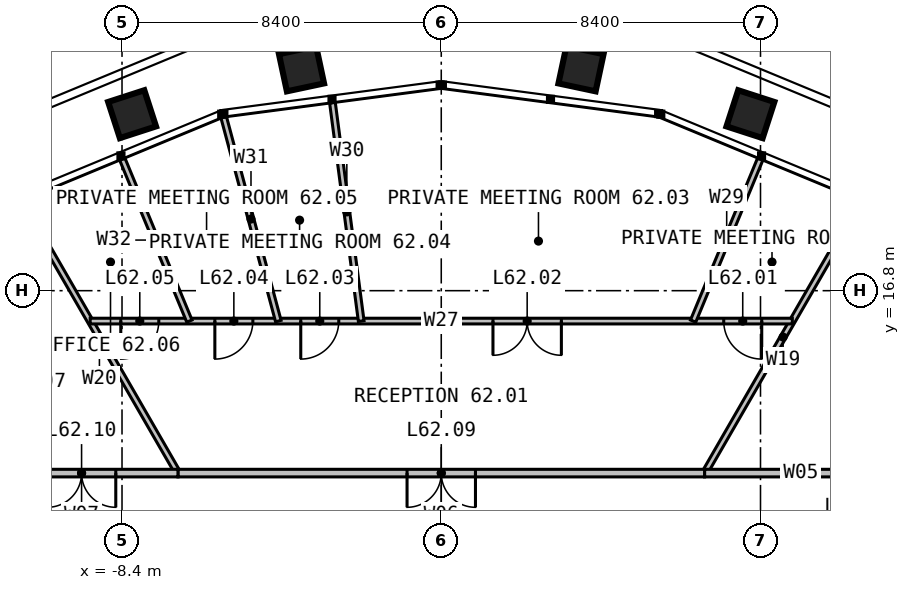
"""IFC4 building model, lengths in metres.
Left out: names, types, materials, properties, quantities, classifications, styles, units other than length and angle.
Written with IfcOpenShell. Run it as: python <this file> out.ifc"""

import sys

from ifc_helpers import new_model, si_unit, direction, frame, frame_2d, origin, place, context, subcontext, project, spatial, rectangle, extrude, element, fill, save


model = new_model("IFC4")
c1 = context("Model", 3, precision=1e-05, world=origin(), true_north=direction((0.0, 1.0)))
c2 = subcontext(c1, "Body", "Model", "MODEL_VIEW")
j1 = project(units=[si_unit("LENGTHUNIT", "METRE"), si_unit("PLANEANGLEUNIT", "RADIAN")], contexts=[c1])
p1 = place(None, origin())
s1 = spatial("IfcSite", under=j1, at=p1, CompositionType="ELEMENT")
p2 = place(p1, origin())
s2 = spatial("IfcBuilding", under=s1, at=p2, CompositionType="ELEMENT")
p3 = place(p2, frame((0.0, 0.0, 256.0)))
s3 = spatial("IfcBuildingStorey", under=s2, at=p3, CompositionType="ELEMENT", Elevation=256.0)
for number, where, z_axis, x_axis in (
    (1, (6.928, 12.0, 0.0), (0.0, 0.0, 1.0), (0.5, 0.866, 0.0)),
    (2, (-6.928, 12.0, 0.0), (0.0, 0.0, 1.0), (-0.5, 0.866, 0.0)),
):
    element("IfcWall", number, at=place(p3, frame(where, z_axis=z_axis, x_axis=x_axis)), inside=s3, PredefinedType="PARTITIONING", context=c2, shape_type="SweptSolid", body=[
        extrude(rectangle(XDim=8.266, YDim=0.15, at=frame_2d((4.133, 0.0))), origin(), (0.0, 0.0, 1.0), 2.79),
    ])
p4 = place(p3, frame((12.0, 12.0, 0.0), z_axis=(0.0, 0.0, 1.0), x_axis=(-1.0, 0.0, 0.0)))
e3 = element("IfcWall", 3, at=p4, inside=s3, PredefinedType="PARTITIONING", context=c2, shape_type="SweptSolid", body=[
    extrude(rectangle(XDim=5.072, YDim=0.2, at=frame_2d((2.536, 0.0))), origin(), (0.0, 0.0, 1.0), 3.8),
])
p5 = place(p3, frame((9.238, 16.0, 0.0), z_axis=(0.0, 0.0, 1.0), x_axis=(-1.0, 0.0, 0.0)))
e4 = element("IfcWall", 4, at=p5, inside=s3, PredefinedType="PARTITIONING", context=c2, shape_type="SweptSolid", body=[
    extrude(rectangle(XDim=18.475, YDim=0.15, at=frame_2d((9.238, 0.0))), origin(), (0.0, 0.0, 1.0), 2.79),
])
p6 = place(p5, frame((0.805, 0.0, 0.0)))
e5 = element("IfcOpeningElement", 5, at=p6, cuts=e4, PredefinedType="OPENING", context=c2, shape_type="SweptSolid", body=[
    extrude(rectangle(XDim=1.0, YDim=2.2, at=frame_2d((0.5, 1.1))), frame((0.0, 0.085, 0.0), z_axis=(0.0, -1.0, 0.0), x_axis=(1.0, 0.0, 0.0)), (0.0, 0.0, 1.0), 0.17),
])
p7 = place(p5, frame((6.077, 0.0, 0.0)))
e6 = element("IfcOpeningElement", 6, at=p7, cuts=e4, PredefinedType="OPENING", context=c2, shape_type="SweptSolid", body=[
    extrude(rectangle(XDim=1.8, YDim=2.2, at=frame_2d((0.9, 1.1))), frame((0.0, 0.085, 0.0), z_axis=(0.0, -1.0, 0.0), x_axis=(1.0, 0.0, 0.0)), (0.0, 0.0, 1.0), 0.17),
])
p8 = place(p5, frame((11.934, 0.0, 0.0)))
e7 = element("IfcOpeningElement", 7, at=p8, cuts=e4, PredefinedType="OPENING", context=c2, shape_type="SweptSolid", body=[
    extrude(rectangle(XDim=1.0, YDim=2.2, at=frame_2d((0.5, 1.1))), frame((0.0, 0.085, 0.0), z_axis=(0.0, -1.0, 0.0), x_axis=(1.0, 0.0, 0.0)), (0.0, 0.0, 1.0), 0.17),
])
p9 = place(p5, frame((14.195, 0.0, 0.0)))
e8 = element("IfcOpeningElement", 8, at=p9, cuts=e4, PredefinedType="OPENING", context=c2, shape_type="SweptSolid", body=[
    extrude(rectangle(XDim=1.0, YDim=2.2, at=frame_2d((0.5, 1.1))), frame((0.0, 0.085, 0.0), z_axis=(0.0, -1.0, 0.0), x_axis=(1.0, 0.0, 0.0)), (0.0, 0.0, 1.0), 0.17),
])
p10 = place(p5, frame((16.67, 0.0, 0.0)))
e9 = element("IfcOpeningElement", 9, at=p10, cuts=e4, PredefinedType="OPENING", context=c2, shape_type="SweptSolid", body=[
    extrude(rectangle(XDim=1.0, YDim=2.2, at=frame_2d((0.5, 1.1))), frame((0.0, 0.085, 0.0), z_axis=(0.0, -1.0, 0.0), x_axis=(1.0, 0.0, 0.0)), (0.0, 0.0, 1.0), 0.17),
])
p11 = place(p3, frame((6.627, 16.0, 0.0), z_axis=(0.0, 0.0, 1.0), x_axis=(0.38266485266, 0.923887228258, 0.0)))
e10 = element("IfcWall", 10, at=p11, inside=s3, PredefinedType="PARTITIONING", context=c2, shape_type="SweptSolid", body=[
    extrude(rectangle(XDim=4.615, YDim=0.15, at=frame_2d((2.307, 0.0))), origin(), (0.0, 0.0, 1.0), 2.79),
])
p12 = place(p3, frame((-2.106, 16.0, 0.0), z_axis=(0.0, 0.0, 1.0), x_axis=(-0.130518811488, 0.991445833038, 0.0)))
e11 = element("IfcWall", 11, at=p12, inside=s3, PredefinedType="PARTITIONING", context=c2, shape_type="SweptSolid", body=[
    extrude(rectangle(XDim=5.795, YDim=0.15, at=frame_2d((2.897, 0.0))), origin(), (0.0, 0.0, 1.0), 2.79),
])
p13 = place(p3, frame((-4.287, 16.0, 0.0), z_axis=(0.0, 0.0, 1.0), x_axis=(-0.25882171764, 0.965925110181, 0.0)))
e12 = element("IfcWall", 12, at=p13, inside=s3, PredefinedType="PARTITIONING", context=c2, shape_type="SweptSolid", body=[
    extrude(rectangle(XDim=5.558, YDim=0.15, at=frame_2d((2.779, 0.0))), origin(), (0.0, 0.0, 1.0), 2.79),
])
p14 = place(p3, frame((-6.627, 16.0, 0.0), z_axis=(0.0, 0.0, 1.0), x_axis=(-0.38266485266, 0.923887228258, 0.0)))
e13 = element("IfcWall", 13, at=p14, inside=s3, PredefinedType="PARTITIONING", context=c2, shape_type="SweptSolid", body=[
    extrude(rectangle(XDim=4.615, YDim=0.15, at=frame_2d((2.307, 0.0))), origin(), (0.0, 0.0, 1.0), 2.79),
])
p15 = place(p3, frame((6.928, 12.0, 0.0), z_axis=(0.0, 0.0, 1.0), x_axis=(-1.0, 0.0, 0.0)))
e14 = element("IfcWall", 14, at=p15, inside=s3, PredefinedType="PARTITIONING", context=c2, shape_type="SweptSolid", body=[
    extrude(rectangle(XDim=13.856, YDim=0.2, at=frame_2d((6.928, 0.0))), origin(), (0.0, 0.0, 1.0), 3.8),
])
p16 = place(p15, frame((6.028, 0.0, 0.0)))
e15 = element("IfcOpeningElement", 15, at=p16, cuts=e14, PredefinedType="OPENING", context=c2, shape_type="SweptSolid", body=[
    extrude(rectangle(XDim=1.8, YDim=2.2, at=frame_2d((0.9, 1.1))), frame((0.0, 0.11, 0.0), z_axis=(0.0, -1.0, 0.0), x_axis=(1.0, 0.0, 0.0)), (0.0, 0.0, 1.0), 0.22),
])
p17 = place(p3, frame((-6.928, 12.0, 0.0), z_axis=(0.0, 0.0, 1.0), x_axis=(-1.0, 0.0, 0.0)))
e16 = element("IfcWall", 16, at=p17, inside=s3, PredefinedType="PARTITIONING", context=c2, shape_type="SweptSolid", body=[
    extrude(rectangle(XDim=5.072, YDim=0.2, at=frame_2d((2.536, 0.0))), origin(), (0.0, 0.0, 1.0), 3.8),
])
p18 = place(p17, frame((1.636, 0.0, 0.0)))
e17 = element("IfcOpeningElement", 17, at=p18, cuts=e16, PredefinedType="OPENING", context=c2, shape_type="SweptSolid", body=[
    extrude(rectangle(XDim=1.8, YDim=2.2, at=frame_2d((0.9, 1.1))), frame((0.0, 0.11, 0.0), z_axis=(0.0, -1.0, 0.0), x_axis=(1.0, 0.0, 0.0)), (0.0, 0.0, 1.0), 0.22),
])
p19 = place(p6, origin())
e18 = element("IfcDoor", 18, at=p19, inside=s3, OperationType="SINGLE_SWING_LEFT", PredefinedType="DOOR", context=c2, shape_type="SweptSolid", body=[
    extrude(rectangle(XDim=1.0, YDim=2.2, at=frame_2d((0.5, 1.1))), frame((0.0, 0.025, 0.0), z_axis=(0.0, -1.0, 0.0), x_axis=(1.0, 0.0, 0.0)), (0.0, 0.0, 1.0), 0.05),
])
fill(e5, e18)
p20 = place(p7, origin())
e19 = element("IfcDoor", 19, at=p20, inside=s3, OperationType="DOUBLE_DOOR_SINGLE_SWING", PredefinedType="DOOR", context=c2, shape_type="SweptSolid", body=[
    extrude(rectangle(XDim=1.8, YDim=2.2, at=frame_2d((0.9, 1.1))), frame((0.0, 0.025, 0.0), z_axis=(0.0, -1.0, 0.0), x_axis=(1.0, 0.0, 0.0)), (0.0, 0.0, 1.0), 0.05),
])
fill(e6, e19)
p21 = place(p8, origin())
e20 = element("IfcDoor", 20, at=p21, inside=s3, OperationType="SINGLE_SWING_RIGHT", PredefinedType="DOOR", context=c2, shape_type="SweptSolid", body=[
    extrude(rectangle(XDim=1.0, YDim=2.2, at=frame_2d((0.5, 1.1))), frame((0.0, 0.025, 0.0), z_axis=(0.0, -1.0, 0.0), x_axis=(1.0, 0.0, 0.0)), (0.0, 0.0, 1.0), 0.05),
])
fill(e7, e20)
p22 = place(p9, origin())
e21 = element("IfcDoor", 21, at=p22, inside=s3, OperationType="SINGLE_SWING_RIGHT", PredefinedType="DOOR", context=c2, shape_type="SweptSolid", body=[
    extrude(rectangle(XDim=1.0, YDim=2.2, at=frame_2d((0.5, 1.1))), frame((0.0, 0.025, 0.0), z_axis=(0.0, -1.0, 0.0), x_axis=(1.0, 0.0, 0.0)), (0.0, 0.0, 1.0), 0.05),
])
fill(e8, e21)
p23 = place(p10, origin())
e22 = element("IfcDoor", 22, at=p23, inside=s3, OperationType="SINGLE_SWING_RIGHT", PredefinedType="DOOR", context=c2, shape_type="SweptSolid", body=[
    extrude(rectangle(XDim=1.0, YDim=2.2, at=frame_2d((0.5, 1.1))), frame((0.0, 0.025, 0.0), z_axis=(0.0, -1.0, 0.0), x_axis=(1.0, 0.0, 0.0)), (0.0, 0.0, 1.0), 0.05),
])
fill(e9, e22)
p24 = place(p16, origin())
e23 = element("IfcDoor", 23, at=p24, inside=s3, OperationType="DOUBLE_DOOR_SINGLE_SWING", PredefinedType="DOOR", context=c2, shape_type="SweptSolid", body=[
    extrude(rectangle(XDim=1.8, YDim=2.2, at=frame_2d((0.9, 1.1))), frame((0.0, 0.025, 0.0), z_axis=(0.0, -1.0, 0.0), x_axis=(1.0, 0.0, 0.0)), (0.0, 0.0, 1.0), 0.05),
])
fill(e15, e23)
p25 = place(p18, origin())
e24 = element("IfcDoor", 24, at=p25, inside=s3, OperationType="DOUBLE_DOOR_SINGLE_SWING", PredefinedType="DOOR", context=c2, shape_type="SweptSolid", body=[
    extrude(rectangle(XDim=1.8, YDim=2.2, at=frame_2d((0.9, 1.1))), frame((0.0, 0.025, 0.0), z_axis=(0.0, -1.0, 0.0), x_axis=(1.0, 0.0, 0.0)), (0.0, 0.0, 1.0), 0.05),
])
fill(e17, e24)
save(model, sys.argv[1])
